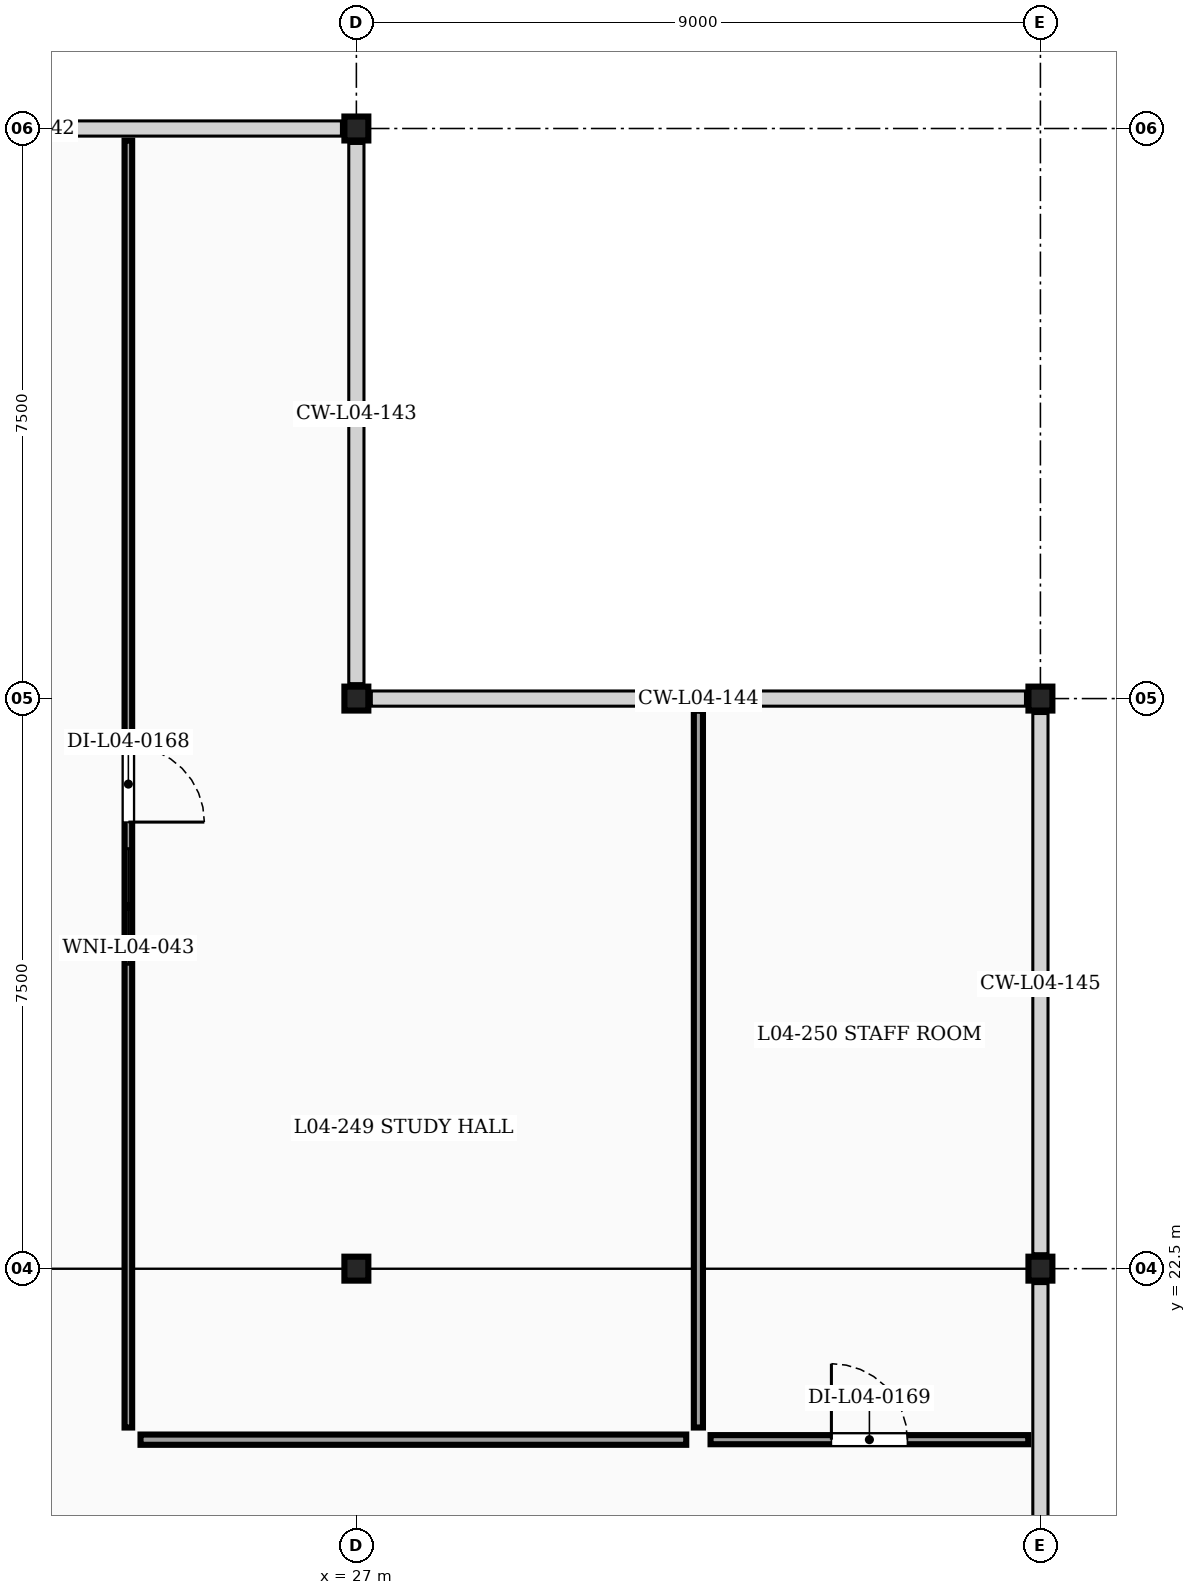
"""IFC4 building model, lengths in metres.
Left out: names, types, materials, properties, quantities, classifications, styles, units other than length and angle.
Written with IfcOpenShell. Run it as: python <this file> out.ifc"""

import sys

from ifc_helpers import new_model, si_unit, direction, frame, frame_2d, origin, origin_2d, place, context, subcontext, project, spatial, rectangle, extrude, element, fill, save


model = new_model("IFC4")
c1 = context("Model", 3, precision=1e-05, world=origin(), true_north=direction((0.0, 1.0)))
c2 = subcontext(c1, "Body", "Model", "MODEL_VIEW")
j1 = project(units=[si_unit("LENGTHUNIT", "METRE"), si_unit("PLANEANGLEUNIT", "RADIAN")], contexts=[c1])
p1 = place(None, origin())
s1 = spatial("IfcSite", under=j1, at=p1, CompositionType="ELEMENT")
p2 = place(p1, origin())
s2 = spatial("IfcBuilding", under=s1, at=p2, CompositionType="ELEMENT")
p3 = place(p2, frame((0.0, 0.0, 16.1)))
s3 = spatial("IfcBuildingStorey", under=s2, at=p3, CompositionType="ELEMENT", Elevation=16.1)
for number, where, z_axis, x_axis in (
    (1, (27.0, 22.5, 0.0), (0.0, 0.0, 1.0), (1.0, 0.0, 0.0)),
    (2, (36.0, 22.5, 0.0), (0.0, 0.0, 1.0), (1.0, 0.0, 0.0)),
    (3, (27.0, 30.0, 0.0), (0.0, 0.0, 1.0), (1.0, 0.0, 0.0)),
    (4, (36.0, 30.0, 0.0), (0.0, 0.0, 1.0), (1.0, 0.0, 0.0)),
    (5, (27.0, 37.5, 0.0), (0.0, 0.0, 1.0), (1.0, 0.0, 0.0)),
):
    element("IfcColumn", number, at=place(p3, frame(where, z_axis=z_axis, x_axis=x_axis)), inside=s3, PredefinedType="COLUMN", context=c2, shape_type="SweptSolid", body=[
        extrude(rectangle(XDim=0.315, YDim=0.315, at=origin_2d()), origin(), (0.0, 0.0, 1.0), 3.65),
    ])
p4 = place(p3, frame((24.0, 37.34, 0.0), z_axis=(0.0, 0.0, 1.0), x_axis=(0.0, -1.0, 0.0)))
e6 = element("IfcWall", 6, at=p4, inside=s3, PredefinedType="PARTITIONING", context=c2, shape_type="SweptSolid", body=[
    extrude(rectangle(XDim=16.93, YDim=0.1, at=frame_2d((8.465, 0.0))), origin(), (0.0, 0.0, 1.0), 3.342),
])
p5 = place(p4, frame((7.965, 0.0, 0.0)))
e7 = element("IfcOpeningElement", 7, at=p5, cuts=e6, PredefinedType="OPENING", context=c2, shape_type="SweptSolid", body=[
    extrude(rectangle(XDim=1.0, YDim=2.15, at=frame_2d((0.5, 1.075))), frame((0.0, 0.06, 0.0), z_axis=(0.0, -1.0, 0.0), x_axis=(1.0, 0.0, 0.0)), (0.0, 0.0, 1.0), 0.12),
])
p6 = place(p4, frame((9.315, 0.0, 1.02)))
e8 = element("IfcOpeningElement", 8, at=p6, cuts=e6, PredefinedType="OPENING", context=c2, shape_type="SweptSolid", body=[
    extrude(rectangle(XDim=1.52, YDim=1.16, at=frame_2d((0.76, 0.58))), frame((0.0, 0.06, 0.0), z_axis=(0.0, -1.0, 0.0), x_axis=(1.0, 0.0, 0.0)), (0.0, 0.0, 1.0), 0.12),
])
p7 = place(p3, frame((24.16, 20.25, 0.0), z_axis=(0.0, 0.0, 1.0), x_axis=(1.0, 0.0, 0.0)))
e9 = element("IfcWall", 9, at=p7, inside=s3, PredefinedType="PARTITIONING", context=c2, shape_type="SweptSolid", body=[
    extrude(rectangle(XDim=7.18, YDim=0.135, at=frame_2d((3.59, 0.0))), origin(), (0.0, 0.0, 1.0), 3.65),
])
p8 = place(p3, frame((31.66, 20.25, 0.0), z_axis=(0.0, 0.0, 1.0), x_axis=(1.0, 0.0, 0.0)))
e10 = element("IfcWall", 10, at=p8, inside=s3, PredefinedType="PARTITIONING", context=c2, shape_type="SweptSolid", body=[
    extrude(rectangle(XDim=4.18, YDim=0.12, at=frame_2d((2.09, 0.0))), origin(), (0.0, 0.0, 1.0), 3.65),
])
p9 = place(p8, frame((1.59, 0.0, 0.0)))
e11 = element("IfcOpeningElement", 11, at=p9, cuts=e10, PredefinedType="OPENING", context=c2, shape_type="SweptSolid", body=[
    extrude(rectangle(XDim=1.0, YDim=2.15, at=frame_2d((0.5, 1.075))), frame((0.0, 0.07, 0.0), z_axis=(0.0, -1.0, 0.0), x_axis=(1.0, 0.0, 0.0)), (0.0, 0.0, 1.0), 0.14),
])
p10 = place(p3, frame((31.5, 20.41, 0.0), z_axis=(0.0, 0.0, 1.0), x_axis=(0.0, 1.0, 0.0)))
e12 = element("IfcWall", 12, at=p10, inside=s3, PredefinedType="PARTITIONING", context=c2, shape_type="SweptSolid", body=[
    extrude(rectangle(XDim=9.43, YDim=0.12, at=frame_2d((4.715, 0.0))), origin(), (0.0, 0.0, 1.0), 3.65),
])
p11 = place(p5, origin())
e13 = element("IfcDoor", 13, at=p11, inside=s3, OperationType="SINGLE_SWING_RIGHT", PredefinedType="DOOR", context=c2, shape_type="SweptSolid", body=[
    extrude(rectangle(XDim=1.0, YDim=2.15, at=frame_2d((0.5, 1.075))), frame((0.0, 0.025, 0.0), z_axis=(0.0, -1.0, 0.0), x_axis=(1.0, 0.0, 0.0)), (0.0, 0.0, 1.0), 0.05),
])
fill(e7, e13)
p12 = place(p6, origin())
e14 = element("IfcWindow", 14, at=p12, inside=s3, PartitioningType="DOUBLE_PANEL_VERTICAL", PredefinedType="WINDOW", context=c2, shape_type="SweptSolid", body=[
    extrude(rectangle(XDim=1.52, YDim=1.16, at=frame_2d((0.76, 0.58))), frame((0.0, 0.03, 0.0), z_axis=(0.0, -1.0, 0.0), x_axis=(1.0, 0.0, 0.0)), (0.0, 0.0, 1.0), 0.06),
])
fill(e8, e14)
p13 = place(p9, origin())
e15 = element("IfcDoor", 15, at=p13, inside=s3, OperationType="SINGLE_SWING_LEFT", PredefinedType="DOOR", context=c2, shape_type="SweptSolid", body=[
    extrude(rectangle(XDim=1.0, YDim=2.15, at=frame_2d((0.5, 1.075))), frame((0.0, 0.025, 0.0), z_axis=(0.0, -1.0, 0.0), x_axis=(1.0, 0.0, 0.0)), (0.0, 0.0, 1.0), 0.05),
])
fill(e11, e15)
save(model, sys.argv[1])
